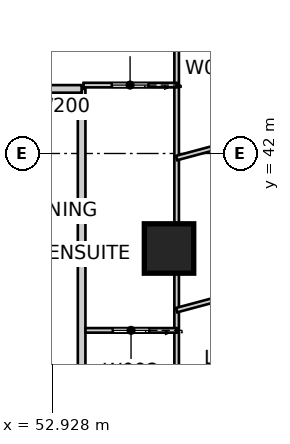
"""IFC4 building model, lengths in metres.
Left out: names, types, materials, properties, quantities, classifications, styles, units other than length and angle.
Written with IfcOpenShell. Run it as: python <this file> out.ifc"""

import sys

from ifc_helpers import new_model, si_unit, direction, frame, frame_2d, origin, origin_2d, place, context, subcontext, project, spatial, rectangle, extrude, element, fill, save


model = new_model("IFC4")
c1 = context("Model", 3, precision=1e-05, world=origin(), true_north=direction((0.0, 1.0)))
c2 = subcontext(c1, "Body", "Model", "MODEL_VIEW")
j1 = project(units=[si_unit("LENGTHUNIT", "METRE"), si_unit("PLANEANGLEUNIT", "RADIAN")], contexts=[c1])
p1 = place(None, origin())
s1 = spatial("IfcSite", under=j1, at=p1, CompositionType="ELEMENT")
p2 = place(p1, origin())
s2 = spatial("IfcBuilding", under=s1, at=p2, CompositionType="ELEMENT")
p3 = place(p2, frame((0.0, 0.0, 128.6)))
s3 = spatial("IfcBuildingStorey", under=s2, at=p3, CompositionType="ELEMENT", Elevation=128.6)
p4 = place(p3, frame((56.0, 39.5, 0.0), z_axis=(0.0, 0.0, 1.0), x_axis=(1.0, 0.0, 0.0)))
e1 = element("IfcColumn", 1, at=p4, inside=s3, PredefinedType="COLUMN", context=c2, shape_type="SweptSolid", body=[
    extrude(rectangle(XDim=1.3, YDim=1.3, at=origin_2d()), origin(), (0.0, 0.0, 1.0), 3.4),
])
p5 = place(p3, frame((53.7, 17.48, 0.0), z_axis=(0.0, 0.0, 1.0), x_axis=(0.0, 1.0, 0.0)))
e2 = element("IfcWall", 2, at=p5, inside=s3, PredefinedType="PARTITIONING", context=c2, shape_type="SweptSolid", body=[
    extrude(rectangle(XDim=26.22, YDim=0.2, at=frame_2d((13.11, 0.0))), origin(), (0.0, 0.0, 1.0), 3.25),
])
p6 = place(p5, frame((2.252, 0.0, 0.0)))
e3 = element("IfcOpeningElement", 3, at=p6, cuts=e2, PredefinedType="OPENING", context=c2, shape_type="SweptSolid", body=[
    extrude(rectangle(XDim=1.02, YDim=2.34, at=frame_2d((0.51, 1.17))), frame((0.0, 0.11, 0.0), z_axis=(0.0, -1.0, 0.0), x_axis=(1.0, 0.0, 0.0)), (0.0, 0.0, 1.0), 0.22),
])
p7 = place(p5, frame((7.328, 0.0, 0.0)))
e4 = element("IfcOpeningElement", 4, at=p7, cuts=e2, PredefinedType="OPENING", context=c2, shape_type="SweptSolid", body=[
    extrude(rectangle(XDim=1.02, YDim=2.34, at=frame_2d((0.51, 1.17))), frame((0.0, 0.11, 0.0), z_axis=(0.0, -1.0, 0.0), x_axis=(1.0, 0.0, 0.0)), (0.0, 0.0, 1.0), 0.22),
])
p8 = place(p3, frame((53.7, 43.7, 0.0), z_axis=(0.0, 0.0, 1.0), x_axis=(-1.0, 0.0, 0.0)))
e5 = element("IfcWall", 5, at=p8, inside=s3, PredefinedType="PARTITIONING", context=c2, shape_type="SweptSolid", body=[
    extrude(rectangle(XDim=1.18, YDim=0.2, at=frame_2d((0.59, 0.0))), origin(), (0.0, 0.0, 1.0), 2.722),
])
p9 = place(p3, frame((56.2, 46.2, 0.0), z_axis=(0.0, 0.0, 1.0), x_axis=(0.0, -1.0, 0.0)))
e6 = element("IfcWall", 6, at=p9, inside=s3, PredefinedType="PARTITIONING", context=c2, shape_type="SweptSolid", body=[
    extrude(rectangle(XDim=33.2, YDim=0.12, at=frame_2d((16.6, 0.0))), origin(), (0.0, 0.0, 1.0), 2.55),
])
p10 = place(p9, frame((23.955, 0.0, 0.0)))
e7 = element("IfcOpeningElement", 7, at=p10, cuts=e6, PredefinedType="OPENING", context=c2, shape_type="SweptSolid", body=[
    extrude(rectangle(XDim=0.92, YDim=2.34, at=frame_2d((0.46, 1.17))), frame((0.0, 0.07, 0.0), z_axis=(0.0, -1.0, 0.0), x_axis=(1.0, 0.0, 0.0)), (0.0, 0.0, 1.0), 0.14),
])
p11 = place(p9, frame((20.966, 0.0, 0.0)))
e8 = element("IfcOpeningElement", 8, at=p11, cuts=e6, PredefinedType="OPENING", context=c2, shape_type="SweptSolid", body=[
    extrude(rectangle(XDim=0.92, YDim=2.34, at=frame_2d((0.46, 1.17))), frame((0.0, 0.07, 0.0), z_axis=(0.0, -1.0, 0.0), x_axis=(1.0, 0.0, 0.0)), (0.0, 0.0, 1.0), 0.14),
])
p12 = place(p9, frame((13.174, 0.0, 0.0)))
e9 = element("IfcOpeningElement", 9, at=p12, cuts=e6, PredefinedType="OPENING", context=c2, shape_type="SweptSolid", body=[
    extrude(rectangle(XDim=0.96, YDim=2.1, at=frame_2d((0.48, 1.05))), frame((0.0, 0.07, 0.0), z_axis=(0.0, -1.0, 0.0), x_axis=(1.0, 0.0, 0.0)), (0.0, 0.0, 1.0), 0.14),
])
p13 = place(p3, frame((56.2, 43.8, 0.0), z_axis=(0.0, 0.0, 1.0), x_axis=(-1.0, 0.0, 0.0)))
e10 = element("IfcWall", 10, at=p13, inside=s3, PredefinedType="PARTITIONING", context=c2, shape_type="SweptSolid", body=[
    extrude(rectangle(XDim=2.45, YDim=0.12, at=frame_2d((1.225, 0.0))), origin(), (0.0, 0.0, 1.0), 2.722),
])
p14 = place(p13, frame((0.745, 0.0, 0.0)))
e11 = element("IfcOpeningElement", 11, at=p14, cuts=e10, PredefinedType="OPENING", context=c2, shape_type="SweptSolid", body=[
    extrude(rectangle(XDim=0.96, YDim=2.1, at=frame_2d((0.48, 1.05))), frame((0.0, 0.07, 0.0), z_axis=(0.0, -1.0, 0.0), x_axis=(1.0, 0.0, 0.0)), (0.0, 0.0, 1.0), 0.14),
])
p15 = place(p3, frame((56.2, 37.345, 0.0), z_axis=(0.0, 0.0, 1.0), x_axis=(-1.0, 0.0, 0.0)))
e12 = element("IfcWall", 12, at=p15, inside=s3, PredefinedType="PARTITIONING", context=c2, shape_type="SweptSolid", body=[
    extrude(rectangle(XDim=2.4, YDim=0.12, at=frame_2d((1.2, 0.0))), origin(), (0.0, 0.0, 1.0), 3.25),
])
p16 = place(p15, frame((0.72, 0.0, 0.0)))
e13 = element("IfcOpeningElement", 13, at=p16, cuts=e12, PredefinedType="OPENING", context=c2, shape_type="SweptSolid", body=[
    extrude(rectangle(XDim=0.96, YDim=2.1, at=frame_2d((0.48, 1.05))), frame((0.0, 0.07, 0.0), z_axis=(0.0, -1.0, 0.0), x_axis=(1.0, 0.0, 0.0)), (0.0, 0.0, 1.0), 0.14),
])
p17 = place(p3, frame((61.741, 43.366, 0.0), z_axis=(0.0, 0.0, 1.0), x_axis=(-0.965924876974, -0.25882258797, 0.0)))
e14 = element("IfcWall", 14, at=p17, inside=s3, PredefinedType="PARTITIONING", context=c2, shape_type="SweptSolid", body=[
    extrude(rectangle(XDim=5.737, YDim=0.12, at=frame_2d((2.869, 0.0))), origin(), (0.0, 0.0, 1.0), 3.25),
])
p18 = place(p17, frame((2.388, 0.0, 0.0)))
e15 = element("IfcOpeningElement", 15, at=p18, cuts=e14, PredefinedType="OPENING", context=c2, shape_type="SweptSolid", body=[
    extrude(rectangle(XDim=0.92, YDim=2.34, at=frame_2d((0.46, 1.17))), frame((0.0, 0.07, 0.0), z_axis=(0.0, -1.0, 0.0), x_axis=(1.0, 0.0, 0.0)), (0.0, 0.0, 1.0), 0.14),
])
p19 = place(p3, frame((56.2, 37.878, 0.0), z_axis=(0.0, 0.0, 1.0), x_axis=(0.96591892777, 0.258844789354, 0.0)))
e16 = element("IfcWall", 16, at=p19, inside=s3, PredefinedType="PARTITIONING", context=c2, shape_type="SweptSolid", body=[
    extrude(rectangle(XDim=6.773, YDim=0.12, at=frame_2d((3.386, 0.0))), origin(), (0.0, 0.0, 1.0), 3.25),
])
p20 = place(p19, frame((2.947, 0.0, 0.0)))
e17 = element("IfcOpeningElement", 17, at=p20, cuts=e16, PredefinedType="OPENING", context=c2, shape_type="SweptSolid", body=[
    extrude(rectangle(XDim=0.92, YDim=2.34, at=frame_2d((0.46, 1.17))), frame((0.0, 0.07, 0.0), z_axis=(0.0, -1.0, 0.0), x_axis=(1.0, 0.0, 0.0)), (0.0, 0.0, 1.0), 0.14),
])
p21 = place(p14, origin())
e18 = element("IfcDoor", 18, at=p21, inside=s3, OperationType="SLIDING_TO_LEFT", PredefinedType="DOOR", context=c2, shape_type="SweptSolid", body=[
    extrude(rectangle(XDim=0.96, YDim=2.1, at=frame_2d((0.48, 1.05))), frame((0.0, 0.025, 0.0), z_axis=(0.0, -1.0, 0.0), x_axis=(1.0, 0.0, 0.0)), (0.0, 0.0, 1.0), 0.05),
])
fill(e11, e18)
p22 = place(p16, origin())
e19 = element("IfcDoor", 19, at=p22, inside=s3, OperationType="SLIDING_TO_LEFT", PredefinedType="DOOR", context=c2, shape_type="SweptSolid", body=[
    extrude(rectangle(XDim=0.96, YDim=2.1, at=frame_2d((0.48, 1.05))), frame((0.0, 0.025, 0.0), z_axis=(0.0, -1.0, 0.0), x_axis=(1.0, 0.0, 0.0)), (0.0, 0.0, 1.0), 0.05),
])
fill(e13, e19)
save(model, sys.argv[1])
